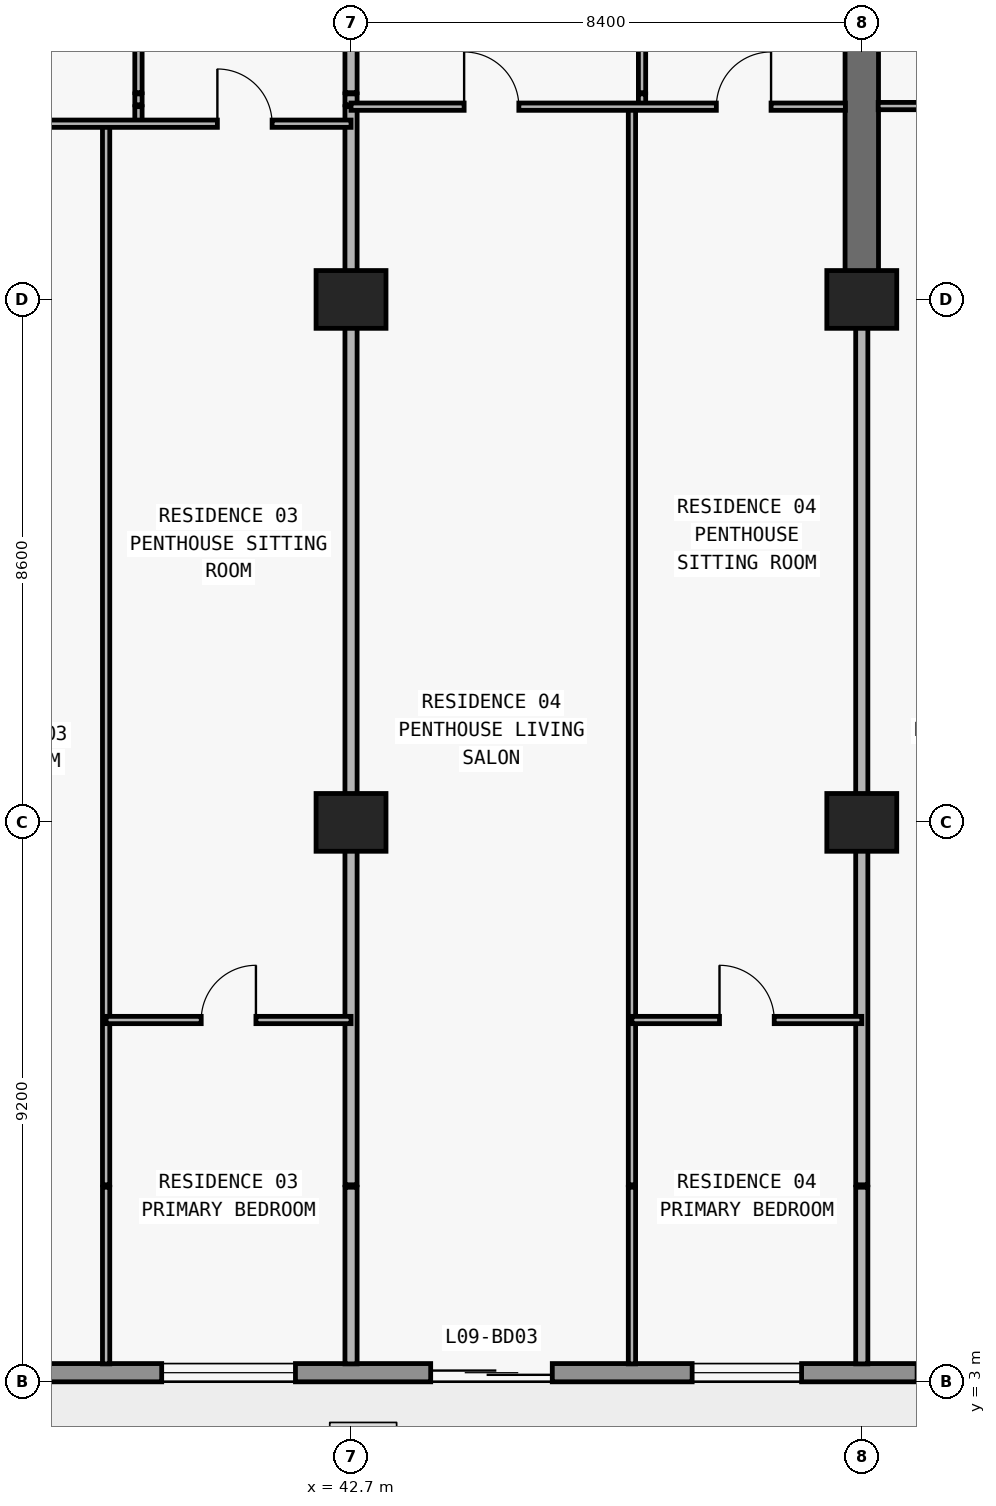
"""IFC4 building model, lengths in metres.
Left out: names, types, materials, properties, quantities, classifications, styles, units other than length and angle.
Written with IfcOpenShell. Run it as: python <this file> out.ifc"""

import sys

from ifc_helpers import new_model, si_unit, direction, frame, frame_2d, origin, origin_2d, place, context, subcontext, project, spatial, rectangle, extrude, element, fill, save


model = new_model("IFC4")
c1 = context("Model", 3, precision=1e-05, world=origin(), true_north=direction((0.0, 1.0)))
c2 = subcontext(c1, "Body", "Model", "MODEL_VIEW")
j1 = project(units=[si_unit("LENGTHUNIT", "METRE"), si_unit("PLANEANGLEUNIT", "RADIAN")], contexts=[c1])
p1 = place(None, origin())
s1 = spatial("IfcSite", under=j1, at=p1, CompositionType="ELEMENT")
p2 = place(p1, origin())
s2 = spatial("IfcBuilding", under=s1, at=p2, CompositionType="ELEMENT")
p3 = place(p2, frame((0.0, 0.0, 39.9)))
s3 = spatial("IfcBuildingStorey", under=s2, at=p3, CompositionType="ELEMENT", Elevation=39.9)
for number, where, z_axis, x_axis in (
    (1, (42.7, 12.2, 0.0), (0.0, 0.0, 1.0), (1.0, 0.0, 0.0)),
    (2, (51.1, 12.2, 0.0), (0.0, 0.0, 1.0), (1.0, 0.0, 0.0)),
    (3, (42.7, 20.8, 0.0), (0.0, 0.0, 1.0), (1.0, 0.0, 0.0)),
    (4, (51.1, 20.8, 0.0), (0.0, 0.0, 1.0), (1.0, 0.0, 0.0)),
):
    element("IfcColumn", number, at=place(p3, frame(where, z_axis=z_axis, x_axis=x_axis)), inside=s3, PredefinedType="COLUMN", context=c2, shape_type="SweptSolid", body=[
        extrude(rectangle(XDim=1.15, YDim=0.95, at=origin_2d()), origin(), (0.0, 0.0, 1.0), 3.05),
    ])
p4 = place(p3, frame((51.1, 20.8, 0.0), z_axis=(0.0, 0.0, 1.0), x_axis=(0.0, 1.0, 0.0)))
e5 = element("IfcWall", 5, at=p4, inside=s3, PredefinedType="SHEAR", context=c2, shape_type="SweptSolid", body=[
    extrude(rectangle(XDim=8.6, YDim=0.55, at=frame_2d((4.3, 0.0))), origin(), (0.0, 0.0, 1.0), 3.05),
])
p5 = place(p3, frame((72.7, 3.15, 0.0), z_axis=(0.0, 0.0, 1.0), x_axis=(-1.0, 0.0, 0.0)))
e6 = element("IfcWall", 6, at=p5, inside=s3, PredefinedType="STANDARD", context=c2, shape_type="SweptSolid", body=[
    extrude(rectangle(XDim=67.6, YDim=0.3, at=frame_2d((33.8, 0.0))), origin(), (0.0, 0.0, 1.0), 3.05),
])
p6 = place(p5, frame((59.89, 0.0, 0.0)))
e7 = element("IfcOpeningElement", 7, at=p6, cuts=e6, PredefinedType="OPENING", context=c2, shape_type="SweptSolid", body=[
    extrude(rectangle(XDim=2.0, YDim=2.3, at=frame_2d((1.0, 1.15))), frame((0.0, 0.16, 0.0), z_axis=(0.0, -1.0, 0.0), x_axis=(1.0, 0.0, 0.0)), (0.0, 0.0, 1.0), 0.32),
])
p7 = place(p5, frame((55.21, 0.0, 0.65)))
e8 = element("IfcOpeningElement", 8, at=p7, cuts=e6, PredefinedType="OPENING", context=c2, shape_type="SweptSolid", body=[
    extrude(rectangle(XDim=2.6, YDim=1.85, at=frame_2d((1.3, 0.925))), frame((0.0, 0.16, 0.0), z_axis=(0.0, -1.0, 0.0), x_axis=(1.0, 0.0, 0.0)), (0.0, 0.0, 1.0), 0.32),
])
p8 = place(p5, frame((49.1, 0.0, 0.85)))
e9 = element("IfcOpeningElement", 9, at=p8, cuts=e6, PredefinedType="OPENING", context=c2, shape_type="SweptSolid", body=[
    extrude(rectangle(XDim=2.2, YDim=1.55, at=frame_2d((1.1, 0.775))), frame((0.0, 0.16, 0.0), z_axis=(0.0, -1.0, 0.0), x_axis=(1.0, 0.0, 0.0)), (0.0, 0.0, 1.0), 0.32),
])
p9 = place(p5, frame((42.69, 0.0, 0.0)))
e10 = element("IfcOpeningElement", 10, at=p9, cuts=e6, PredefinedType="OPENING", context=c2, shape_type="SweptSolid", body=[
    extrude(rectangle(XDim=2.0, YDim=2.3, at=frame_2d((1.0, 1.15))), frame((0.0, 0.16, 0.0), z_axis=(0.0, -1.0, 0.0), x_axis=(1.0, 0.0, 0.0)), (0.0, 0.0, 1.0), 0.32),
])
p10 = place(p5, frame((38.59, 0.0, 0.85)))
e11 = element("IfcOpeningElement", 11, at=p10, cuts=e6, PredefinedType="OPENING", context=c2, shape_type="SweptSolid", body=[
    extrude(rectangle(XDim=1.8, YDim=1.55, at=frame_2d((0.9, 0.775))), frame((0.0, 0.16, 0.0), z_axis=(0.0, -1.0, 0.0), x_axis=(1.0, 0.0, 0.0)), (0.0, 0.0, 1.0), 0.32),
])
p11 = place(p5, frame((30.914, 0.0, 0.85)))
e12 = element("IfcOpeningElement", 12, at=p11, cuts=e6, PredefinedType="OPENING", context=c2, shape_type="SweptSolid", body=[
    extrude(rectangle(XDim=2.2, YDim=1.55, at=frame_2d((1.1, 0.775))), frame((0.0, 0.16, 0.0), z_axis=(0.0, -1.0, 0.0), x_axis=(1.0, 0.0, 0.0)), (0.0, 0.0, 1.0), 0.32),
])
p12 = place(p5, frame((26.69, 0.0, 0.0)))
e13 = element("IfcOpeningElement", 13, at=p12, cuts=e6, PredefinedType="OPENING", context=c2, shape_type="SweptSolid", body=[
    extrude(rectangle(XDim=2.0, YDim=2.3, at=frame_2d((1.0, 1.15))), frame((0.0, 0.16, 0.0), z_axis=(0.0, -1.0, 0.0), x_axis=(1.0, 0.0, 0.0)), (0.0, 0.0, 1.0), 0.32),
])
p13 = place(p5, frame((22.59, 0.0, 0.85)))
e14 = element("IfcOpeningElement", 14, at=p13, cuts=e6, PredefinedType="OPENING", context=c2, shape_type="SweptSolid", body=[
    extrude(rectangle(XDim=1.8, YDim=1.55, at=frame_2d((0.9, 0.775))), frame((0.0, 0.16, 0.0), z_axis=(0.0, -1.0, 0.0), x_axis=(1.0, 0.0, 0.0)), (0.0, 0.0, 1.0), 0.32),
])
p14 = place(p5, frame((18.69, 0.0, 0.0)))
e15 = element("IfcOpeningElement", 15, at=p14, cuts=e6, PredefinedType="OPENING", context=c2, shape_type="SweptSolid", body=[
    extrude(rectangle(XDim=2.0, YDim=2.3, at=frame_2d((1.0, 1.15))), frame((0.0, 0.16, 0.0), z_axis=(0.0, -1.0, 0.0), x_axis=(1.0, 0.0, 0.0)), (0.0, 0.0, 1.0), 0.32),
])
p15 = place(p5, frame((14.01, 0.0, 0.65)))
e16 = element("IfcOpeningElement", 16, at=p15, cuts=e6, PredefinedType="OPENING", context=c2, shape_type="SweptSolid", body=[
    extrude(rectangle(XDim=2.6, YDim=1.85, at=frame_2d((1.3, 0.925))), frame((0.0, 0.16, 0.0), z_axis=(0.0, -1.0, 0.0), x_axis=(1.0, 0.0, 0.0)), (0.0, 0.0, 1.0), 0.32),
])
p16 = place(p5, frame((7.9, 0.0, 0.85)))
e17 = element("IfcOpeningElement", 17, at=p16, cuts=e6, PredefinedType="OPENING", context=c2, shape_type="SweptSolid", body=[
    extrude(rectangle(XDim=2.2, YDim=1.55, at=frame_2d((1.1, 0.775))), frame((0.0, 0.16, 0.0), z_axis=(0.0, -1.0, 0.0), x_axis=(1.0, 0.0, 0.0)), (0.0, 0.0, 1.0), 0.32),
])
p17 = place(p3, frame((38.672, 3.295, 0.0), z_axis=(0.0, 0.0, 1.0), x_axis=(0.0, 1.0, 0.0)))
e18 = element("IfcWall", 18, at=p17, inside=s3, PredefinedType="PARTITIONING", context=c2, shape_type="SweptSolid", body=[
    extrude(rectangle(XDim=2.905, YDim=0.12, at=frame_2d((1.453, 0.0))), origin(), (0.0, 0.0, 1.0), 3.05),
])
p18 = place(p3, frame((38.672, 6.24, 0.0), z_axis=(0.0, 0.0, 1.0), x_axis=(0.0, 1.0, 0.0)))
e19 = element("IfcWall", 19, at=p18, inside=s3, PredefinedType="PARTITIONING", context=c2, shape_type="SweptSolid", body=[
    extrude(rectangle(XDim=17.45, YDim=0.12, at=frame_2d((8.725, 0.0))), origin(), (0.0, 0.0, 1.0), 2.423),
])
p19 = place(p3, frame((39.204, 23.69, 0.0), z_axis=(0.0, 0.0, 1.0), x_axis=(0.0, 1.0, 0.0)))
e20 = element("IfcWall", 20, at=p19, inside=s3, PredefinedType="PARTITIONING", context=c2, shape_type="SweptSolid", body=[
    extrude(rectangle(XDim=0.28, YDim=0.12, at=frame_2d((0.14, 0.0))), origin(), (0.0, 0.0, 1.0), 3.05),
])
p20 = place(p3, frame((39.204, 24.0, 0.0), z_axis=(0.0, 0.0, 1.0), x_axis=(0.0, 1.0, 0.0)))
e21 = element("IfcWall", 21, at=p20, inside=s3, PredefinedType="PARTITIONING", context=c2, shape_type="SweptSolid", body=[
    extrude(rectangle(XDim=0.18, YDim=0.12, at=frame_2d((0.09, 0.0))), origin(), (0.0, 0.0, 1.0), 3.05),
])
p21 = place(p3, frame((39.204, 24.2, 0.0), z_axis=(0.0, 0.0, 1.0), x_axis=(0.0, 1.0, 0.0)))
e22 = element("IfcWall", 22, at=p21, inside=s3, PredefinedType="PARTITIONING", context=c2, shape_type="SweptSolid", body=[
    extrude(rectangle(XDim=4.38, YDim=0.12, at=frame_2d((2.19, 0.0))), origin(), (0.0, 0.0, 1.0), 3.05),
])
p22 = place(p21, frame((1.74, 0.0, 0.0)))
e23 = element("IfcOpeningElement", 23, at=p22, cuts=e22, PredefinedType="OPENING", context=c2, shape_type="SweptSolid", body=[
    extrude(rectangle(XDim=0.9, YDim=2.15, at=frame_2d((0.45, 1.075))), frame((0.0, 0.07, 0.0), z_axis=(0.0, -1.0, 0.0), x_axis=(1.0, 0.0, 0.0)), (0.0, 0.0, 1.0), 0.14),
])
p23 = place(p3, frame((42.7, 3.295, 0.0), z_axis=(0.0, 0.0, 1.0), x_axis=(0.0, 1.0, 0.0)))
e24 = element("IfcWall", 24, at=p23, inside=s3, PredefinedType="PARTITIONING", context=c2, shape_type="SweptSolid", body=[
    extrude(rectangle(XDim=2.905, YDim=0.2, at=frame_2d((1.453, 0.0))), origin(), (0.0, 0.0, 1.0), 3.05),
])
p24 = place(p3, frame((42.7, 6.24, 0.0), z_axis=(0.0, 0.0, 1.0), x_axis=(0.0, 1.0, 0.0)))
e25 = element("IfcWall", 25, at=p24, inside=s3, PredefinedType="PARTITIONING", context=c2, shape_type="SweptSolid", body=[
    extrude(rectangle(XDim=17.73, YDim=0.2, at=frame_2d((8.865, 0.0))), origin(), (0.0, 0.0, 1.0), 2.11),
])
p25 = place(p3, frame((42.7, 24.0, 0.0), z_axis=(0.0, 0.0, 1.0), x_axis=(0.0, 1.0, 0.0)))
e26 = element("IfcWall", 26, at=p25, inside=s3, PredefinedType="PARTITIONING", context=c2, shape_type="SweptSolid", body=[
    extrude(rectangle(XDim=0.18, YDim=0.2, at=frame_2d((0.09, 0.0))), origin(), (0.0, 0.0, 1.0), 2.11),
])
p26 = place(p3, frame((42.7, 24.2, 0.0), z_axis=(0.0, 0.0, 1.0), x_axis=(0.0, 1.0, 0.0)))
e27 = element("IfcWall", 27, at=p26, inside=s3, PredefinedType="PARTITIONING", context=c2, shape_type="SweptSolid", body=[
    extrude(rectangle(XDim=4.38, YDim=0.2, at=frame_2d((2.19, 0.0))), origin(), (0.0, 0.0, 1.0), 2.11),
])
p27 = place(p3, frame((47.32, 3.295, 0.0), z_axis=(0.0, 0.0, 1.0), x_axis=(0.0, 1.0, 0.0)))
e28 = element("IfcWall", 28, at=p27, inside=s3, PredefinedType="PARTITIONING", context=c2, shape_type="SweptSolid", body=[
    extrude(rectangle(XDim=2.905, YDim=0.12, at=frame_2d((1.453, 0.0))), origin(), (0.0, 0.0, 1.0), 3.05),
])
p28 = place(p3, frame((47.32, 6.24, 0.0), z_axis=(0.0, 0.0, 1.0), x_axis=(0.0, 1.0, 0.0)))
e29 = element("IfcWall", 29, at=p28, inside=s3, PredefinedType="PARTITIONING", context=c2, shape_type="SweptSolid", body=[
    extrude(rectangle(XDim=17.73, YDim=0.12, at=frame_2d((8.865, 0.0))), origin(), (0.0, 0.0, 1.0), 3.05),
])
p29 = place(p3, frame((47.486, 24.0, 0.0), z_axis=(0.0, 0.0, 1.0), x_axis=(0.0, 1.0, 0.0)))
e30 = element("IfcWall", 30, at=p29, inside=s3, PredefinedType="PARTITIONING", context=c2, shape_type="SweptSolid", body=[
    extrude(rectangle(XDim=0.18, YDim=0.12, at=frame_2d((0.09, 0.0))), origin(), (0.0, 0.0, 1.0), 3.05),
])
p30 = place(p3, frame((47.486, 24.2, 0.0), z_axis=(0.0, 0.0, 1.0), x_axis=(0.0, 1.0, 0.0)))
e31 = element("IfcWall", 31, at=p30, inside=s3, PredefinedType="PARTITIONING", context=c2, shape_type="SweptSolid", body=[
    extrude(rectangle(XDim=4.38, YDim=0.12, at=frame_2d((2.19, 0.0))), origin(), (0.0, 0.0, 1.0), 3.05),
])
p31 = place(p30, frame((1.74, 0.0, 0.0)))
e32 = element("IfcOpeningElement", 32, at=p31, cuts=e31, PredefinedType="OPENING", context=c2, shape_type="SweptSolid", body=[
    extrude(rectangle(XDim=0.9, YDim=2.15, at=frame_2d((0.45, 1.075))), frame((0.0, 0.07, 0.0), z_axis=(0.0, -1.0, 0.0), x_axis=(1.0, 0.0, 0.0)), (0.0, 0.0, 1.0), 0.14),
])
p32 = place(p3, frame((51.1, 3.295, 0.0), z_axis=(0.0, 0.0, 1.0), x_axis=(0.0, 1.0, 0.0)))
e33 = element("IfcWall", 33, at=p32, inside=s3, PredefinedType="PARTITIONING", context=c2, shape_type="SweptSolid", body=[
    extrude(rectangle(XDim=2.905, YDim=0.2, at=frame_2d((1.453, 0.0))), origin(), (0.0, 0.0, 1.0), 3.05),
])
p33 = place(p3, frame((51.1, 6.24, 0.0), z_axis=(0.0, 0.0, 1.0), x_axis=(0.0, 1.0, 0.0)))
e34 = element("IfcWall", 34, at=p33, inside=s3, PredefinedType="PARTITIONING", context=c2, shape_type="SweptSolid", body=[
    extrude(rectangle(XDim=14.555, YDim=0.2, at=frame_2d((7.277, 0.0))), origin(), (0.0, 0.0, 1.0), 2.11),
])
p34 = place(p3, frame((38.672, 8.95, 0.0), z_axis=(0.0, 0.0, 1.0), x_axis=(1.0, 0.0, 0.0)))
e35 = element("IfcWall", 35, at=p34, inside=s3, PredefinedType="PARTITIONING", context=c2, shape_type="SweptSolid", body=[
    extrude(rectangle(XDim=4.028, YDim=0.12, at=frame_2d((2.014, 0.0))), origin(), (0.0, 0.0, 1.0), 3.05),
])
p35 = place(p34, frame((1.564, 0.0, 0.0)))
e36 = element("IfcOpeningElement", 36, at=p35, cuts=e35, PredefinedType="OPENING", context=c2, shape_type="SweptSolid", body=[
    extrude(rectangle(XDim=0.9, YDim=2.15, at=frame_2d((0.45, 1.075))), frame((0.0, 0.07, 0.0), z_axis=(0.0, -1.0, 0.0), x_axis=(1.0, 0.0, 0.0)), (0.0, 0.0, 1.0), 0.14),
])
p36 = place(p3, frame((47.32, 8.95, 0.0), z_axis=(0.0, 0.0, 1.0), x_axis=(1.0, 0.0, 0.0)))
e37 = element("IfcWall", 37, at=p36, inside=s3, PredefinedType="PARTITIONING", context=c2, shape_type="SweptSolid", body=[
    extrude(rectangle(XDim=3.78, YDim=0.12, at=frame_2d((1.89, 0.0))), origin(), (0.0, 0.0, 1.0), 3.05),
])
p37 = place(p36, frame((1.44, 0.0, 0.0)))
e38 = element("IfcOpeningElement", 38, at=p37, cuts=e37, PredefinedType="OPENING", context=c2, shape_type="SweptSolid", body=[
    extrude(rectangle(XDim=0.9, YDim=2.15, at=frame_2d((0.45, 1.075))), frame((0.0, 0.07, 0.0), z_axis=(0.0, -1.0, 0.0), x_axis=(1.0, 0.0, 0.0)), (0.0, 0.0, 1.0), 0.14),
])
p38 = place(p3, frame((35.1, 23.69, 0.0), z_axis=(0.0, 0.0, 1.0), x_axis=(1.0, 0.0, 0.0)))
e39 = element("IfcWall", 39, at=p38, inside=s3, PredefinedType="PARTITIONING", context=c2, shape_type="SweptSolid", body=[
    extrude(rectangle(XDim=7.6, YDim=0.12, at=frame_2d((3.8, 0.0))), origin(), (0.0, 0.0, 1.0), 3.05),
])
p39 = place(p38, frame((1.336, 0.0, 0.0)))
e40 = element("IfcOpeningElement", 40, at=p39, cuts=e39, PredefinedType="OPENING", context=c2, shape_type="SweptSolid", body=[
    extrude(rectangle(XDim=0.9, YDim=2.15, at=frame_2d((0.45, 1.075))), frame((0.0, 0.07, 0.0), z_axis=(0.0, -1.0, 0.0), x_axis=(1.0, 0.0, 0.0)), (0.0, 0.0, 1.0), 0.14),
])
p40 = place(p38, frame((5.402, 0.0, 0.0)))
e41 = element("IfcOpeningElement", 41, at=p40, cuts=e39, PredefinedType="OPENING", context=c2, shape_type="SweptSolid", body=[
    extrude(rectangle(XDim=0.9, YDim=2.15, at=frame_2d((0.45, 1.075))), frame((0.0, 0.07, 0.0), z_axis=(0.0, -1.0, 0.0), x_axis=(1.0, 0.0, 0.0)), (0.0, 0.0, 1.0), 0.14),
])
p41 = place(p3, frame((42.7, 23.97, 0.0), z_axis=(0.0, 0.0, 1.0), x_axis=(1.0, 0.0, 0.0)))
e42 = element("IfcWall", 42, at=p41, inside=s3, PredefinedType="PARTITIONING", context=c2, shape_type="SweptSolid", body=[
    extrude(rectangle(XDim=8.13, YDim=0.12, at=frame_2d((4.065, 0.0))), origin(), (0.0, 0.0, 1.0), 3.05),
])
p42 = place(p41, frame((1.86, 0.0, 0.0)))
e43 = element("IfcOpeningElement", 43, at=p42, cuts=e42, PredefinedType="OPENING", context=c2, shape_type="SweptSolid", body=[
    extrude(rectangle(XDim=0.9, YDim=2.15, at=frame_2d((0.45, 1.075))), frame((0.0, 0.07, 0.0), z_axis=(0.0, -1.0, 0.0), x_axis=(1.0, 0.0, 0.0)), (0.0, 0.0, 1.0), 0.14),
])
p43 = place(p41, frame((6.008, 0.0, 0.0)))
e44 = element("IfcOpeningElement", 44, at=p43, cuts=e42, PredefinedType="OPENING", context=c2, shape_type="SweptSolid", body=[
    extrude(rectangle(XDim=0.9, YDim=2.15, at=frame_2d((0.45, 1.075))), frame((0.0, 0.07, 0.0), z_axis=(0.0, -1.0, 0.0), x_axis=(1.0, 0.0, 0.0)), (0.0, 0.0, 1.0), 0.14),
])
p44 = place(p3, frame((51.37, 23.98, 0.0), z_axis=(0.0, 0.0, 1.0), x_axis=(1.0, 0.0, 0.0)))
e45 = element("IfcWall", 45, at=p44, inside=s3, PredefinedType="PARTITIONING", context=c2, shape_type="SweptSolid", body=[
    extrude(rectangle(XDim=8.13, YDim=0.12, at=frame_2d((4.065, 0.0))), origin(), (0.0, 0.0, 1.0), 3.05),
])
p45 = place(p44, frame((1.305, 0.0, 0.0)))
e46 = element("IfcOpeningElement", 46, at=p45, cuts=e45, PredefinedType="OPENING", context=c2, shape_type="SweptSolid", body=[
    extrude(rectangle(XDim=0.9, YDim=2.15, at=frame_2d((0.45, 1.075))), frame((0.0, 0.07, 0.0), z_axis=(0.0, -1.0, 0.0), x_axis=(1.0, 0.0, 0.0)), (0.0, 0.0, 1.0), 0.14),
])
p46 = place(p11, origin())
e47 = element("IfcWindow", 47, at=p46, inside=s3, PartitioningType="SINGLE_PANEL", PredefinedType="WINDOW", context=c2, shape_type="SweptSolid", body=[
    extrude(rectangle(XDim=2.2, YDim=1.55, at=frame_2d((1.1, 0.775))), frame((0.0, 0.03, 0.0), z_axis=(0.0, -1.0, 0.0), x_axis=(1.0, 0.0, 0.0)), (0.0, 0.0, 1.0), 0.06),
])
fill(e12, e47)
p47 = place(p12, origin())
e48 = element("IfcDoor", 48, at=p47, inside=s3, OperationType="DOUBLE_DOOR_SLIDING", PredefinedType="DOOR", context=c2, shape_type="SweptSolid", body=[
    extrude(rectangle(XDim=2.0, YDim=2.3, at=frame_2d((1.0, 1.15))), frame((0.0, 0.025, 0.0), z_axis=(0.0, -1.0, 0.0), x_axis=(1.0, 0.0, 0.0)), (0.0, 0.0, 1.0), 0.05),
])
fill(e13, e48)
p48 = place(p13, origin())
e49 = element("IfcWindow", 49, at=p48, inside=s3, PartitioningType="SINGLE_PANEL", PredefinedType="WINDOW", context=c2, shape_type="SweptSolid", body=[
    extrude(rectangle(XDim=1.8, YDim=1.55, at=frame_2d((0.9, 0.775))), frame((0.0, 0.03, 0.0), z_axis=(0.0, -1.0, 0.0), x_axis=(1.0, 0.0, 0.0)), (0.0, 0.0, 1.0), 0.06),
])
fill(e14, e49)
p49 = place(p40, origin())
e50 = element("IfcDoor", 50, at=p49, inside=s3, OperationType="SINGLE_SWING_LEFT", PredefinedType="DOOR", context=c2, shape_type="SweptSolid", body=[
    extrude(rectangle(XDim=0.9, YDim=2.15, at=frame_2d((0.45, 1.075))), frame((0.0, 0.025, 0.0), z_axis=(0.0, -1.0, 0.0), x_axis=(1.0, 0.0, 0.0)), (0.0, 0.0, 1.0), 0.05),
])
fill(e41, e50)
p50 = place(p35, origin())
e51 = element("IfcDoor", 51, at=p50, inside=s3, OperationType="SINGLE_SWING_RIGHT", PredefinedType="DOOR", context=c2, shape_type="SweptSolid", body=[
    extrude(rectangle(XDim=0.9, YDim=2.15, at=frame_2d((0.45, 1.075))), frame((0.0, 0.025, 0.0), z_axis=(0.0, -1.0, 0.0), x_axis=(1.0, 0.0, 0.0)), (0.0, 0.0, 1.0), 0.05),
])
fill(e36, e51)
p51 = place(p42, origin())
e52 = element("IfcDoor", 52, at=p51, inside=s3, OperationType="SINGLE_SWING_LEFT", PredefinedType="DOOR", context=c2, shape_type="SweptSolid", body=[
    extrude(rectangle(XDim=0.9, YDim=2.15, at=frame_2d((0.45, 1.075))), frame((0.0, 0.025, 0.0), z_axis=(0.0, -1.0, 0.0), x_axis=(1.0, 0.0, 0.0)), (0.0, 0.0, 1.0), 0.05),
])
fill(e43, e52)
p52 = place(p43, origin())
e53 = element("IfcDoor", 53, at=p52, inside=s3, OperationType="SINGLE_SWING_RIGHT", PredefinedType="DOOR", context=c2, shape_type="SweptSolid", body=[
    extrude(rectangle(XDim=0.9, YDim=2.15, at=frame_2d((0.45, 1.075))), frame((0.0, 0.025, 0.0), z_axis=(0.0, -1.0, 0.0), x_axis=(1.0, 0.0, 0.0)), (0.0, 0.0, 1.0), 0.05),
])
fill(e44, e53)
p53 = place(p37, origin())
e54 = element("IfcDoor", 54, at=p53, inside=s3, OperationType="SINGLE_SWING_LEFT", PredefinedType="DOOR", context=c2, shape_type="SweptSolid", body=[
    extrude(rectangle(XDim=0.9, YDim=2.15, at=frame_2d((0.45, 1.075))), frame((0.0, 0.025, 0.0), z_axis=(0.0, -1.0, 0.0), x_axis=(1.0, 0.0, 0.0)), (0.0, 0.0, 1.0), 0.05),
])
fill(e38, e54)
save(model, sys.argv[1])
